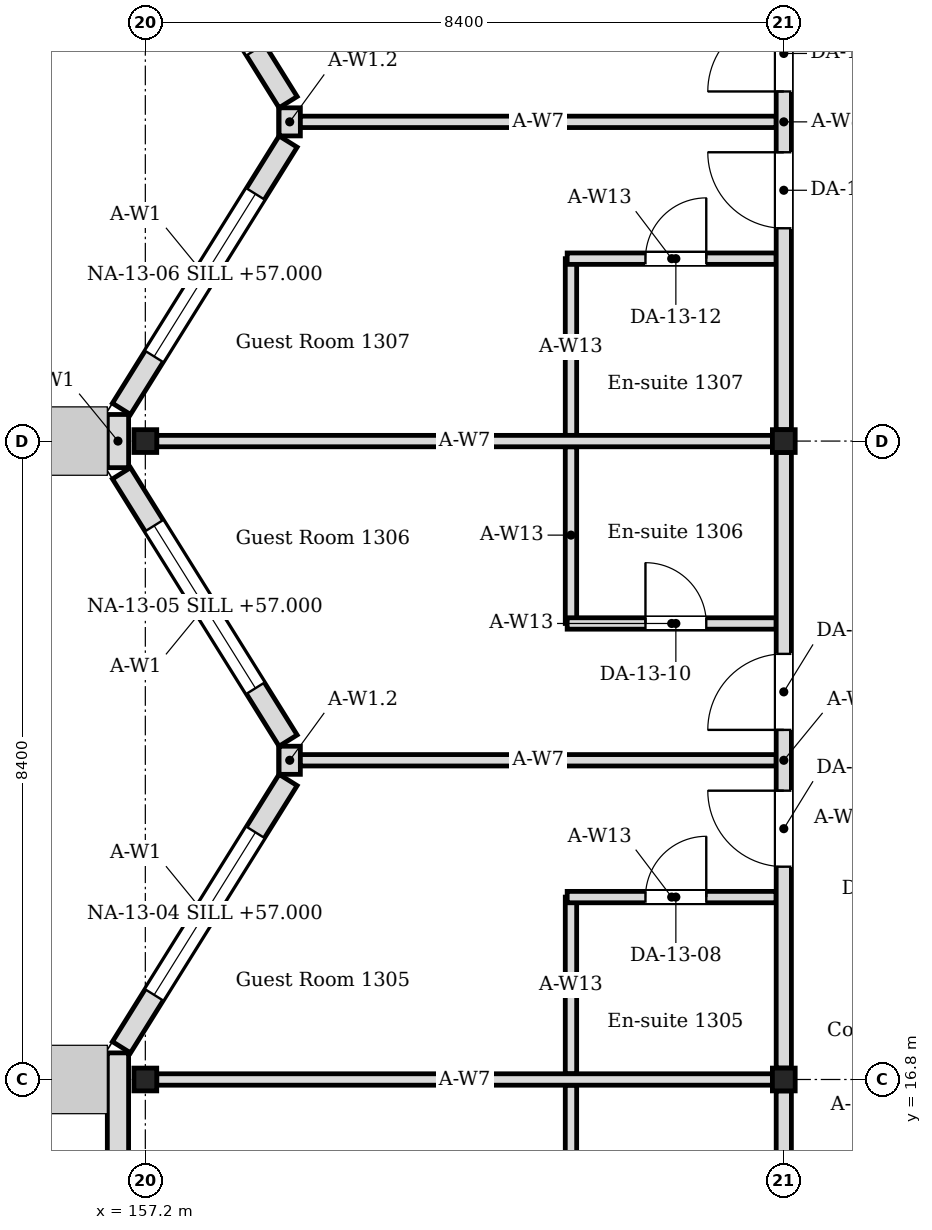
"""IFC4 building model, lengths in metres.
Left out: names, types, materials, properties, quantities, classifications, styles, units other than length and angle.
Written with IfcOpenShell. Run it as: python <this file> out.ifc"""

import sys

from ifc_helpers import new_model, si_unit, direction, frame, frame_2d, origin, origin_2d, place, context, subcontext, project, spatial, rectangle, i_section, extrude, element, fill, save


model = new_model("IFC4")
c1 = context("Model", 3, precision=1e-05, world=origin(), true_north=direction((0.0, 1.0)))
c2 = subcontext(c1, "Body", "Model", "MODEL_VIEW")
j1 = project(units=[si_unit("LENGTHUNIT", "METRE"), si_unit("PLANEANGLEUNIT", "RADIAN")], contexts=[c1])
p1 = place(None, origin())
s1 = spatial("IfcSite", under=j1, at=p1, CompositionType="ELEMENT")
p2 = place(p1, origin())
s2 = spatial("IfcBuilding", under=s1, at=p2, CompositionType="ELEMENT")
p3 = place(p2, frame((0.0, 0.0, 56.4)))
s3 = spatial("IfcBuildingStorey", under=s2, at=p3, CompositionType="ELEMENT", Elevation=56.4)
for number, where, z_axis, x_axis in (
    (1, (157.2, 16.8, 0.0), (0.0, 0.0, 1.0), (1.0, 0.0, 0.0)),
    (2, (157.2, 25.2, 0.0), (0.0, 0.0, 1.0), (1.0, 0.0, 0.0)),
    (3, (165.6, 16.8, 0.0), (0.0, 0.0, 1.0), (1.0, 0.0, 0.0)),
    (4, (165.6, 25.2, 0.0), (0.0, 0.0, 1.0), (1.0, 0.0, 0.0)),
):
    element("IfcColumn", number, at=place(p3, frame(where, z_axis=z_axis, x_axis=x_axis)), inside=s3, PredefinedType="COLUMN", context=c2, shape_type="SweptSolid", body=[
        extrude(i_section(OverallWidth=0.3, OverallDepth=0.3, WebThickness=0.01, FlangeThickness=0.015, FilletRadius=0.013, at=origin_2d()), origin(), (0.0, 0.0, 1.0), 4.2),
    ])
p4 = place(p3, frame((156.84, 8.05, 0.0), z_axis=(0.0, 0.0, 1.0), x_axis=(0.0, 1.0, 0.0)))
e5 = element("IfcWall", 5, at=p4, inside=s3, PredefinedType="SOLIDWALL", context=c2, shape_type="SweptSolid", body=[
    extrude(rectangle(XDim=9.1, YDim=0.28, at=frame_2d((4.55, 0.0))), origin(), (0.0, 0.0, 1.0), 4.05),
])
p5 = place(p4, frame((2.03, 0.0, 0.6)))
e6 = element("IfcOpeningElement", 6, at=p5, cuts=e5, PredefinedType="OPENING", context=c2, shape_type="SweptSolid", body=[
    extrude(rectangle(XDim=5.04, YDim=2.4, at=frame_2d((2.52, 1.2))), frame((0.0, 0.15, 0.0), z_axis=(0.0, -1.0, 0.0), x_axis=(1.0, 0.0, 0.0)), (0.0, 0.0, 1.0), 0.3),
])
p6 = place(p3, frame((156.886, 17.224, 0.0), z_axis=(0.0, 0.0, 1.0), x_axis=(0.529018946142, 0.848610013271, 0.0)))
e7 = element("IfcWall", 7, at=p6, inside=s3, PredefinedType="SOLIDWALL", context=c2, shape_type="SweptSolid", body=[
    extrude(rectangle(XDim=4.144, YDim=0.28, at=frame_2d((2.072, 0.0))), origin(), (0.0, 0.0, 1.0), 4.05),
])
p7 = place(p6, frame((0.812, 0.0, 0.6)))
e8 = element("IfcOpeningElement", 8, at=p7, cuts=e7, PredefinedType="OPENING", context=c2, shape_type="SweptSolid", body=[
    extrude(rectangle(XDim=2.52, YDim=2.4, at=frame_2d((1.26, 1.2))), frame((0.0, 0.15, 0.0), z_axis=(0.0, -1.0, 0.0), x_axis=(1.0, 0.0, 0.0)), (0.0, 0.0, 1.0), 0.3),
])
p8 = place(p3, frame((159.079, 21.259, 0.0), z_axis=(0.0, 0.0, 1.0), x_axis=(-0.529018946142, 0.848610013271, 0.0)))
e9 = element("IfcWall", 9, at=p8, inside=s3, PredefinedType="SOLIDWALL", context=c2, shape_type="SweptSolid", body=[
    extrude(rectangle(XDim=4.144, YDim=0.28, at=frame_2d((2.072, 0.0))), origin(), (0.0, 0.0, 1.0), 4.05),
])
p9 = place(p8, frame((0.812, 0.0, 0.6)))
e10 = element("IfcOpeningElement", 10, at=p9, cuts=e9, PredefinedType="OPENING", context=c2, shape_type="SweptSolid", body=[
    extrude(rectangle(XDim=2.52, YDim=2.4, at=frame_2d((1.26, 1.2))), frame((0.0, 0.15, 0.0), z_axis=(0.0, -1.0, 0.0), x_axis=(1.0, 0.0, 0.0)), (0.0, 0.0, 1.0), 0.3),
])
p10 = place(p3, frame((159.1, 20.815, 0.0), z_axis=(0.0, 0.0, 1.0), x_axis=(0.0, 1.0, 0.0)))
e11 = element("IfcWall", 11, at=p10, inside=s3, PredefinedType="SOLIDWALL", context=c2, shape_type="SweptSolid", body=[
    extrude(rectangle(XDim=0.37, YDim=0.28, at=frame_2d((0.185, 0.0))), origin(), (0.0, 0.0, 1.0), 3.604),
])
p11 = place(p3, frame((156.84, 24.85, 0.0), z_axis=(0.0, 0.0, 1.0), x_axis=(0.0, 1.0, 0.0)))
e12 = element("IfcWall", 12, at=p11, inside=s3, PredefinedType="SOLIDWALL", context=c2, shape_type="SweptSolid", body=[
    extrude(rectangle(XDim=0.7, YDim=0.28, at=frame_2d((0.35, 0.0))), origin(), (0.0, 0.0, 1.0), 4.05),
])
p12 = place(p3, frame((156.886, 25.624, 0.0), z_axis=(0.0, 0.0, 1.0), x_axis=(0.528992500338, 0.848626498871, 0.0)))
e13 = element("IfcWall", 13, at=p12, inside=s3, PredefinedType="SOLIDWALL", context=c2, shape_type="SweptSolid", body=[
    extrude(rectangle(XDim=4.145, YDim=0.28, at=frame_2d((2.072, 0.0))), origin(), (0.0, 0.0, 1.0), 4.05),
])
p13 = place(p12, frame((0.812, 0.0, 0.6)))
e14 = element("IfcOpeningElement", 14, at=p13, cuts=e13, PredefinedType="OPENING", context=c2, shape_type="SweptSolid", body=[
    extrude(rectangle(XDim=2.52, YDim=2.4, at=frame_2d((1.26, 1.2))), frame((0.0, 0.15, 0.0), z_axis=(0.0, -1.0, 0.0), x_axis=(1.0, 0.0, 0.0)), (0.0, 0.0, 1.0), 0.3),
])
p14 = place(p3, frame((159.079, 29.659, 0.0), z_axis=(0.0, 0.0, 1.0), x_axis=(-0.529018946142, 0.848610013271, 0.0)))
e15 = element("IfcWall", 15, at=p14, inside=s3, PredefinedType="SOLIDWALL", context=c2, shape_type="SweptSolid", body=[
    extrude(rectangle(XDim=4.144, YDim=0.28, at=frame_2d((2.072, 0.0))), origin(), (0.0, 0.0, 1.0), 4.05),
])
p15 = place(p14, frame((0.812, 0.0, 0.6)))
e16 = element("IfcOpeningElement", 16, at=p15, cuts=e15, PredefinedType="OPENING", context=c2, shape_type="SweptSolid", body=[
    extrude(rectangle(XDim=2.52, YDim=2.4, at=frame_2d((1.26, 1.2))), frame((0.0, 0.15, 0.0), z_axis=(0.0, -1.0, 0.0), x_axis=(1.0, 0.0, 0.0)), (0.0, 0.0, 1.0), 0.3),
])
p16 = place(p3, frame((159.1, 29.215, 0.0), z_axis=(0.0, 0.0, 1.0), x_axis=(0.0, 1.0, 0.0)))
e17 = element("IfcWall", 17, at=p16, inside=s3, PredefinedType="SOLIDWALL", context=c2, shape_type="SweptSolid", body=[
    extrude(rectangle(XDim=0.37, YDim=0.28, at=frame_2d((0.185, 0.0))), origin(), (0.0, 0.0, 1.0), 3.604),
])
p17 = place(p3, frame((162.8, 14.4, 0.0), z_axis=(0.0, 0.0, 1.0), x_axis=(0.0, 1.0, 0.0)))
e18 = element("IfcWall", 18, at=p17, inside=s3, PredefinedType="PARTITIONING", context=c2, shape_type="SweptSolid", body=[
    extrude(rectangle(XDim=2.325, YDim=0.15, at=frame_2d((1.163, 0.0))), origin(), (0.0, 0.0, 1.0), 4.05),
])
p18 = place(p3, frame((162.8, 16.875, 0.0), z_axis=(0.0, 0.0, 1.0), x_axis=(0.0, 1.0, 0.0)))
e19 = element("IfcWall", 19, at=p18, inside=s3, PredefinedType="PARTITIONING", context=c2, shape_type="SweptSolid", body=[
    extrude(rectangle(XDim=2.325, YDim=0.15, at=frame_2d((1.163, 0.0))), origin(), (0.0, 0.0, 1.0), 4.05),
])
p19 = place(p3, frame((162.75, 19.2, 0.0), z_axis=(0.0, 0.0, 1.0), x_axis=(1.0, 0.0, 0.0)))
e20 = element("IfcWall", 20, at=p19, inside=s3, PredefinedType="PARTITIONING", context=c2, shape_type="SweptSolid", body=[
    extrude(rectangle(XDim=2.75, YDim=0.15, at=frame_2d((1.375, 0.0))), origin(), (0.0, 0.0, 1.0), 4.05),
])
p20 = place(p19, frame((1.03, 0.0, 0.0)))
e21 = element("IfcOpeningElement", 21, at=p20, cuts=e20, PredefinedType="OPENING", context=c2, shape_type="SweptSolid", body=[
    extrude(rectangle(XDim=0.8, YDim=2.1, at=frame_2d((0.4, 1.05))), frame((0.0, 0.085, 0.0), z_axis=(0.0, -1.0, 0.0), x_axis=(1.0, 0.0, 0.0)), (0.0, 0.0, 1.0), 0.17),
])
p21 = place(p3, frame((162.8, 22.8, 0.0), z_axis=(0.0, 0.0, 1.0), x_axis=(0.0, 1.0, 0.0)))
e22 = element("IfcWall", 22, at=p21, inside=s3, PredefinedType="PARTITIONING", context=c2, shape_type="SweptSolid", body=[
    extrude(rectangle(XDim=2.325, YDim=0.15, at=frame_2d((1.163, 0.0))), origin(), (0.0, 0.0, 1.0), 4.05),
])
p22 = place(p3, frame((162.75, 22.8, 0.0), z_axis=(0.0, 0.0, 1.0), x_axis=(1.0, 0.0, 0.0)))
e23 = element("IfcWall", 23, at=p22, inside=s3, PredefinedType="PARTITIONING", context=c2, shape_type="SweptSolid", body=[
    extrude(rectangle(XDim=2.75, YDim=0.15, at=frame_2d((1.375, 0.0))), origin(), (0.0, 0.0, 1.0), 4.05),
])
p23 = place(p22, frame((1.03, 0.0, 0.0)))
e24 = element("IfcOpeningElement", 24, at=p23, cuts=e23, PredefinedType="OPENING", context=c2, shape_type="SweptSolid", body=[
    extrude(rectangle(XDim=0.8, YDim=2.1, at=frame_2d((0.4, 1.05))), frame((0.0, 0.085, 0.0), z_axis=(0.0, -1.0, 0.0), x_axis=(1.0, 0.0, 0.0)), (0.0, 0.0, 1.0), 0.17),
])
p24 = place(p3, frame((162.8, 25.275, 0.0), z_axis=(0.0, 0.0, 1.0), x_axis=(0.0, 1.0, 0.0)))
e25 = element("IfcWall", 25, at=p24, inside=s3, PredefinedType="PARTITIONING", context=c2, shape_type="SweptSolid", body=[
    extrude(rectangle(XDim=2.325, YDim=0.15, at=frame_2d((1.163, 0.0))), origin(), (0.0, 0.0, 1.0), 4.05),
])
p25 = place(p3, frame((162.75, 27.6, 0.0), z_axis=(0.0, 0.0, 1.0), x_axis=(1.0, 0.0, 0.0)))
e26 = element("IfcWall", 26, at=p25, inside=s3, PredefinedType="PARTITIONING", context=c2, shape_type="SweptSolid", body=[
    extrude(rectangle(XDim=2.75, YDim=0.15, at=frame_2d((1.375, 0.0))), origin(), (0.0, 0.0, 1.0), 4.05),
])
p26 = place(p25, frame((1.03, 0.0, 0.0)))
e27 = element("IfcOpeningElement", 27, at=p26, cuts=e26, PredefinedType="OPENING", context=c2, shape_type="SweptSolid", body=[
    extrude(rectangle(XDim=0.8, YDim=2.1, at=frame_2d((0.4, 1.05))), frame((0.0, 0.085, 0.0), z_axis=(0.0, -1.0, 0.0), x_axis=(1.0, 0.0, 0.0)), (0.0, 0.0, 1.0), 0.17),
])
for number, where, z_axis, x_axis in (
    (28, (157.35, 16.8, 0.0), (0.0, 0.0, 1.0), (1.0, 0.0, 0.0)),
    (29, (157.35, 25.2, 0.0), (0.0, 0.0, 1.0), (1.0, 0.0, 0.0)),
):
    element("IfcWall", number, at=place(p3, frame(where, z_axis=z_axis, x_axis=x_axis)), inside=s3, PredefinedType="PARTITIONING", context=c2, shape_type="SweptSolid", body=[
        extrude(rectangle(XDim=8.1, YDim=0.15, at=frame_2d((4.05, 0.0))), origin(), (0.0, 0.0, 1.0), 3.604),
    ])
for number, where, z_axis, x_axis in (
    (30, (159.24, 21.0, 0.0), (0.0, 0.0, 1.0), (1.0, 0.0, 0.0)),
    (31, (159.24, 29.4, 0.0), (0.0, 0.0, 1.0), (1.0, 0.0, 0.0)),
):
    element("IfcWall", number, at=place(p3, frame(where, z_axis=z_axis, x_axis=x_axis)), inside=s3, PredefinedType="PARTITIONING", context=c2, shape_type="SweptSolid", body=[
        extrude(rectangle(XDim=6.26, YDim=0.15, at=frame_2d((3.13, 0.0))), origin(), (0.0, 0.0, 1.0), 3.604),
    ])
p27 = place(p3, frame((165.6, 8.55, 0.0), z_axis=(0.0, 0.0, 1.0), x_axis=(0.0, 1.0, 0.0)))
e32 = element("IfcWall", 32, at=p27, inside=s3, PredefinedType="PARTITIONING", context=c2, shape_type="SweptSolid", body=[
    extrude(rectangle(XDim=8.1, YDim=0.2, at=frame_2d((4.05, 0.0))), origin(), (0.0, 0.0, 1.0), 3.45),
])
p28 = place(p27, frame((3.5, 0.0, 0.0)))
e33 = element("IfcOpeningElement", 33, at=p28, cuts=e32, PredefinedType="OPENING", context=c2, shape_type="SweptSolid", body=[
    extrude(rectangle(XDim=1.1, YDim=2.4, at=frame_2d((0.55, 1.2))), frame((0.0, 0.11, 0.0), z_axis=(0.0, -1.0, 0.0), x_axis=(1.0, 0.0, 0.0)), (0.0, 0.0, 1.0), 0.22),
])
p29 = place(p3, frame((165.6, 16.95, 0.0), z_axis=(0.0, 0.0, 1.0), x_axis=(0.0, 1.0, 0.0)))
e34 = element("IfcWall", 34, at=p29, inside=s3, PredefinedType="PARTITIONING", context=c2, shape_type="SweptSolid", body=[
    extrude(rectangle(XDim=8.1, YDim=0.2, at=frame_2d((4.05, 0.0))), origin(), (0.0, 0.0, 1.0), 3.45),
])
p30 = place(p29, frame((2.65, 0.0, 0.0)))
e35 = element("IfcOpeningElement", 35, at=p30, cuts=e34, PredefinedType="OPENING", context=c2, shape_type="SweptSolid", body=[
    extrude(rectangle(XDim=1.0, YDim=2.4, at=frame_2d((0.5, 1.2))), frame((0.0, 0.11, 0.0), z_axis=(0.0, -1.0, 0.0), x_axis=(1.0, 0.0, 0.0)), (0.0, 0.0, 1.0), 0.22),
])
p31 = place(p29, frame((4.45, 0.0, 0.0)))
e36 = element("IfcOpeningElement", 36, at=p31, cuts=e34, PredefinedType="OPENING", context=c2, shape_type="SweptSolid", body=[
    extrude(rectangle(XDim=1.0, YDim=2.4, at=frame_2d((0.5, 1.2))), frame((0.0, 0.11, 0.0), z_axis=(0.0, -1.0, 0.0), x_axis=(1.0, 0.0, 0.0)), (0.0, 0.0, 1.0), 0.22),
])
p32 = place(p3, frame((165.6, 25.35, 0.0), z_axis=(0.0, 0.0, 1.0), x_axis=(0.0, 1.0, 0.0)))
e37 = element("IfcWall", 37, at=p32, inside=s3, PredefinedType="PARTITIONING", context=c2, shape_type="SweptSolid", body=[
    extrude(rectangle(XDim=8.1, YDim=0.2, at=frame_2d((4.05, 0.0))), origin(), (0.0, 0.0, 1.0), 3.45),
])
p33 = place(p32, frame((2.65, 0.0, 0.0)))
e38 = element("IfcOpeningElement", 38, at=p33, cuts=e37, PredefinedType="OPENING", context=c2, shape_type="SweptSolid", body=[
    extrude(rectangle(XDim=1.0, YDim=2.4, at=frame_2d((0.5, 1.2))), frame((0.0, 0.11, 0.0), z_axis=(0.0, -1.0, 0.0), x_axis=(1.0, 0.0, 0.0)), (0.0, 0.0, 1.0), 0.22),
])
p34 = place(p32, frame((4.45, 0.0, 0.0)))
e39 = element("IfcOpeningElement", 39, at=p34, cuts=e37, PredefinedType="OPENING", context=c2, shape_type="SweptSolid", body=[
    extrude(rectangle(XDim=1.0, YDim=2.4, at=frame_2d((0.5, 1.2))), frame((0.0, 0.11, 0.0), z_axis=(0.0, -1.0, 0.0), x_axis=(1.0, 0.0, 0.0)), (0.0, 0.0, 1.0), 0.22),
])
p35 = place(p7, origin())
e40 = element("IfcWindow", 40, at=p35, inside=s3, PartitioningType="SINGLE_PANEL", PredefinedType="WINDOW", context=c2, shape_type="SweptSolid", body=[
    extrude(rectangle(XDim=2.52, YDim=2.4, at=frame_2d((1.26, 1.2))), frame((0.0, 0.03, 0.0), z_axis=(0.0, -1.0, 0.0), x_axis=(1.0, 0.0, 0.0)), (0.0, 0.0, 1.0), 0.06),
])
fill(e8, e40)
p36 = place(p9, origin())
e41 = element("IfcWindow", 41, at=p36, inside=s3, PartitioningType="SINGLE_PANEL", PredefinedType="WINDOW", context=c2, shape_type="SweptSolid", body=[
    extrude(rectangle(XDim=2.52, YDim=2.4, at=frame_2d((1.26, 1.2))), frame((0.0, 0.03, 0.0), z_axis=(0.0, -1.0, 0.0), x_axis=(1.0, 0.0, 0.0)), (0.0, 0.0, 1.0), 0.06),
])
fill(e10, e41)
p37 = place(p13, origin())
e42 = element("IfcWindow", 42, at=p37, inside=s3, PartitioningType="SINGLE_PANEL", PredefinedType="WINDOW", context=c2, shape_type="SweptSolid", body=[
    extrude(rectangle(XDim=2.52, YDim=2.4, at=frame_2d((1.26, 1.2))), frame((0.0, 0.03, 0.0), z_axis=(0.0, -1.0, 0.0), x_axis=(1.0, 0.0, 0.0)), (0.0, 0.0, 1.0), 0.06),
])
fill(e14, e42)
p38 = place(p20, origin())
e43 = element("IfcDoor", 43, at=p38, inside=s3, OperationType="SINGLE_SWING_RIGHT", PredefinedType="DOOR", context=c2, shape_type="SweptSolid", body=[
    extrude(rectangle(XDim=0.8, YDim=2.1, at=frame_2d((0.4, 1.05))), frame((0.0, 0.025, 0.0), z_axis=(0.0, -1.0, 0.0), x_axis=(1.0, 0.0, 0.0)), (0.0, 0.0, 1.0), 0.05),
])
fill(e21, e43)
p39 = place(p30, origin())
e44 = element("IfcDoor", 44, at=p39, inside=s3, OperationType="SINGLE_SWING_RIGHT", PredefinedType="DOOR", context=c2, shape_type="SweptSolid", body=[
    extrude(rectangle(XDim=1.0, YDim=2.4, at=frame_2d((0.5, 1.2))), frame((0.0, 0.025, 0.0), z_axis=(0.0, -1.0, 0.0), x_axis=(1.0, 0.0, 0.0)), (0.0, 0.0, 1.0), 0.05),
])
fill(e35, e44)
p40 = place(p23, origin())
e45 = element("IfcDoor", 45, at=p40, inside=s3, OperationType="SINGLE_SWING_LEFT", PredefinedType="DOOR", context=c2, shape_type="SweptSolid", body=[
    extrude(rectangle(XDim=0.8, YDim=2.1, at=frame_2d((0.4, 1.05))), frame((0.0, 0.025, 0.0), z_axis=(0.0, -1.0, 0.0), x_axis=(1.0, 0.0, 0.0)), (0.0, 0.0, 1.0), 0.05),
])
fill(e24, e45)
p41 = place(p31, origin())
e46 = element("IfcDoor", 46, at=p41, inside=s3, OperationType="SINGLE_SWING_LEFT", PredefinedType="DOOR", context=c2, shape_type="SweptSolid", body=[
    extrude(rectangle(XDim=1.0, YDim=2.4, at=frame_2d((0.5, 1.2))), frame((0.0, 0.025, 0.0), z_axis=(0.0, -1.0, 0.0), x_axis=(1.0, 0.0, 0.0)), (0.0, 0.0, 1.0), 0.05),
])
fill(e36, e46)
p42 = place(p26, origin())
e47 = element("IfcDoor", 47, at=p42, inside=s3, OperationType="SINGLE_SWING_RIGHT", PredefinedType="DOOR", context=c2, shape_type="SweptSolid", body=[
    extrude(rectangle(XDim=0.8, YDim=2.1, at=frame_2d((0.4, 1.05))), frame((0.0, 0.025, 0.0), z_axis=(0.0, -1.0, 0.0), x_axis=(1.0, 0.0, 0.0)), (0.0, 0.0, 1.0), 0.05),
])
fill(e27, e47)
p43 = place(p33, origin())
e48 = element("IfcDoor", 48, at=p43, inside=s3, OperationType="SINGLE_SWING_RIGHT", PredefinedType="DOOR", context=c2, shape_type="SweptSolid", body=[
    extrude(rectangle(XDim=1.0, YDim=2.4, at=frame_2d((0.5, 1.2))), frame((0.0, 0.025, 0.0), z_axis=(0.0, -1.0, 0.0), x_axis=(1.0, 0.0, 0.0)), (0.0, 0.0, 1.0), 0.05),
])
fill(e38, e48)
p44 = place(p34, origin())
e49 = element("IfcDoor", 49, at=p44, inside=s3, OperationType="SINGLE_SWING_LEFT", PredefinedType="DOOR", context=c2, shape_type="SweptSolid", body=[
    extrude(rectangle(XDim=1.0, YDim=2.4, at=frame_2d((0.5, 1.2))), frame((0.0, 0.025, 0.0), z_axis=(0.0, -1.0, 0.0), x_axis=(1.0, 0.0, 0.0)), (0.0, 0.0, 1.0), 0.05),
])
fill(e39, e49)
save(model, sys.argv[1])
